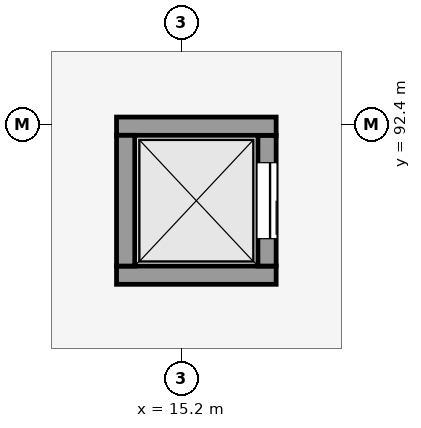
"""IFC4 building model, lengths in metres.
Left out: names, types, materials, properties, quantities, classifications, styles, units other than length and angle.
Written with IfcOpenShell. Run it as: python <this file> out.ifc"""

import sys

from ifc_helpers import new_model, si_unit, direction, frame, frame_2d, origin, place, context, subcontext, project, spatial, rectangle, extrude, element, fill, save


model = new_model("IFC4")
c1 = context("Model", 3, precision=1e-05, world=origin(), true_north=direction((0.0, 1.0)))
c2 = subcontext(c1, "Body", "Model", "MODEL_VIEW")
j1 = project(units=[si_unit("LENGTHUNIT", "METRE"), si_unit("PLANEANGLEUNIT", "RADIAN")], contexts=[c1])
p1 = place(None, origin())
s1 = spatial("IfcSite", under=j1, at=p1, CompositionType="ELEMENT")
p2 = place(p1, origin())
s2 = spatial("IfcBuilding", under=s1, at=p2, CompositionType="ELEMENT")
p3 = place(p2, frame((0.0, 0.0, 17.25)))
s3 = spatial("IfcBuildingStorey", under=s2, at=p3, CompositionType="ELEMENT", Elevation=17.25)
p4 = place(p3, frame((9.91, 96.222, 0.0), z_axis=(0.0, 0.0, 1.0), x_axis=(0.96792914822, -0.251223334956, 0.0)))
e1 = element("IfcWall", 1, at=p4, inside=s3, PredefinedType="SHEAR", context=c2, shape_type="SweptSolid", body=[
    extrude(rectangle(XDim=12.1, YDim=0.38, at=frame_2d((6.05, 0.0))), origin(), (0.0, 0.0, 1.0), 3.75),
])
p5 = place(p3, frame((16.45, 90.42, 0.0), z_axis=(0.0, 0.0, 1.0), x_axis=(-1.0, 0.0, 0.0)))
e2 = element("IfcWall", 2, at=p5, inside=s3, PredefinedType="SHEAR", context=c2, shape_type="SweptSolid", body=[
    extrude(rectangle(XDim=2.1, YDim=0.24, at=frame_2d((1.05, 0.0))), origin(), (0.0, 0.0, 1.0), 4.05),
])
p6 = place(p3, frame((16.33, 92.26, 0.0), z_axis=(0.0, 0.0, 1.0), x_axis=(0.0, -1.0, 0.0)))
e3 = element("IfcWall", 3, at=p6, inside=s3, PredefinedType="SHEAR", context=c2, shape_type="SweptSolid", body=[
    extrude(rectangle(XDim=1.72, YDim=0.24, at=frame_2d((0.86, 0.0))), origin(), (0.0, 0.0, 1.0), 4.05),
])
p7 = place(p6, frame((0.36, 0.0, 0.0)))
e4 = element("IfcOpeningElement", 4, at=p7, cuts=e3, PredefinedType="OPENING", context=c2, shape_type="SweptSolid", body=[
    extrude(rectangle(XDim=1.0, YDim=2.15, at=frame_2d((0.5, 1.075))), frame((0.0, 0.13, 0.0), z_axis=(0.0, -1.0, 0.0), x_axis=(1.0, 0.0, 0.0)), (0.0, 0.0, 1.0), 0.26),
])
p8 = place(p3, frame((14.35, 92.38, 0.0), z_axis=(0.0, 0.0, 1.0), x_axis=(1.0, 0.0, 0.0)))
e5 = element("IfcWall", 5, at=p8, inside=s3, PredefinedType="SHEAR", context=c2, shape_type="SweptSolid", body=[
    extrude(rectangle(XDim=2.1, YDim=0.24, at=frame_2d((1.05, 0.0))), origin(), (0.0, 0.0, 1.0), 4.05),
])
p9 = place(p3, frame((14.47, 90.54, 0.0), z_axis=(0.0, 0.0, 1.0), x_axis=(0.0, 1.0, 0.0)))
e6 = element("IfcWall", 6, at=p9, inside=s3, PredefinedType="SHEAR", context=c2, shape_type="SweptSolid", body=[
    extrude(rectangle(XDim=1.72, YDim=0.24, at=frame_2d((0.86, 0.0))), origin(), (0.0, 0.0, 1.0), 4.05),
])
p10 = place(p7, origin())
e7 = element("IfcDoor", 7, at=p10, inside=s3, OperationType="SLIDING_TO_RIGHT", PredefinedType="DOOR", context=c2, shape_type="SweptSolid", body=[
    extrude(rectangle(XDim=1.0, YDim=2.15, at=frame_2d((0.5, 1.075))), frame((0.0, 0.025, 0.0), z_axis=(0.0, -1.0, 0.0), x_axis=(1.0, 0.0, 0.0)), (0.0, 0.0, 1.0), 0.05),
])
fill(e4, e7)
save(model, sys.argv[1])
